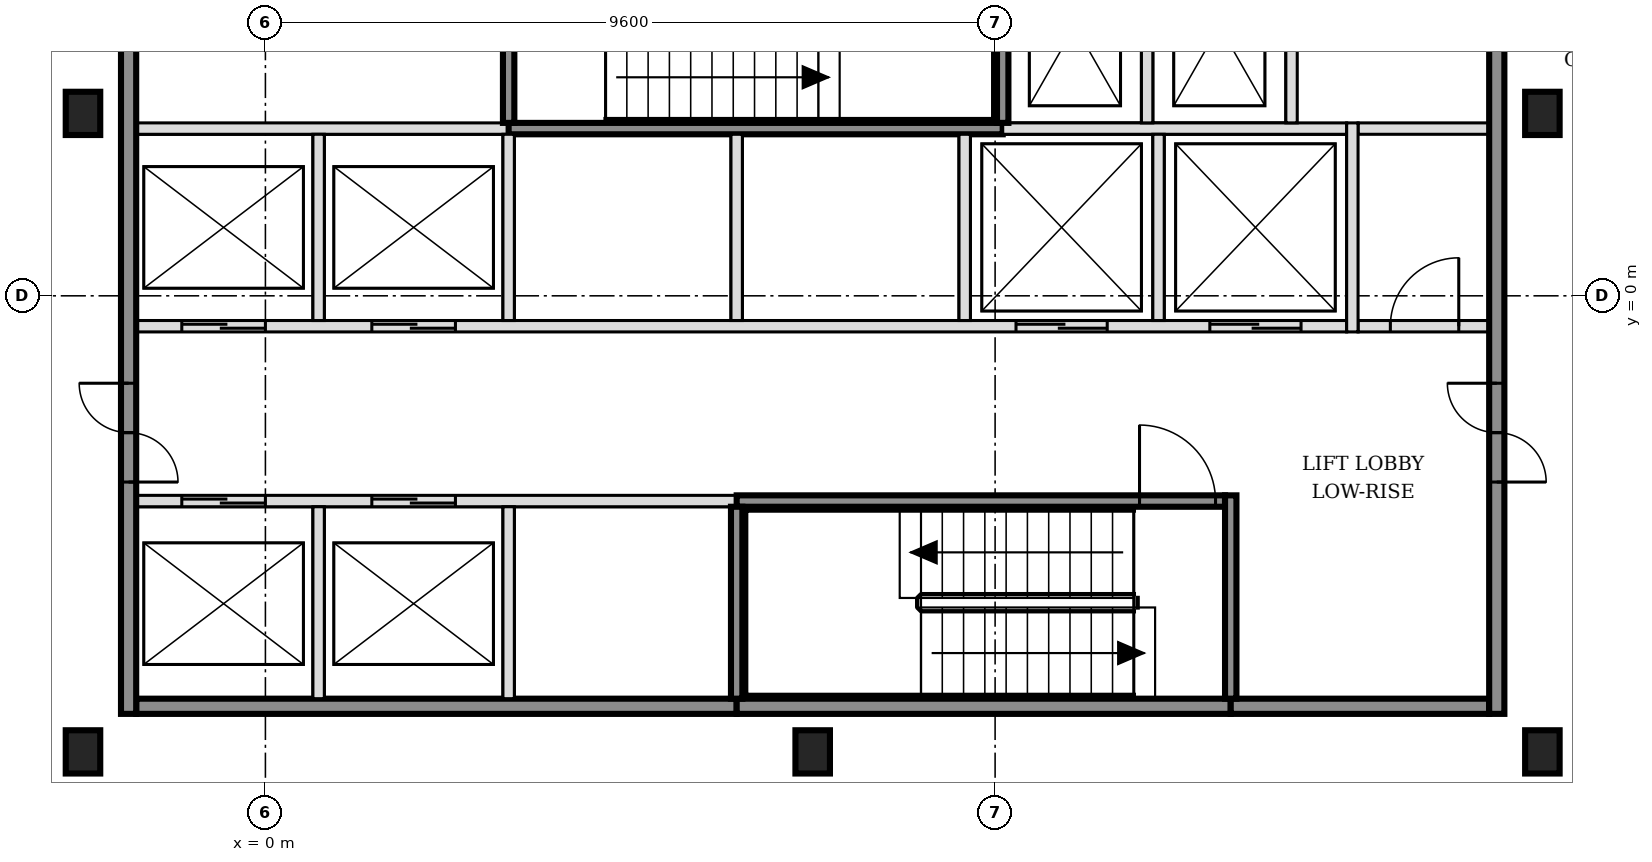
"""IFC4 building model, lengths in metres.
Left out: names, types, materials, properties, quantities, classifications, styles, units other than length and angle.
Written with IfcOpenShell. Run it as: python <this file> out.ifc"""

import sys

from ifc_helpers import new_model, si_unit, direction, frame, frame_2d, origin, origin_2d, place, context, subcontext, project, spatial, rectangle, i_section, extrude, element, fill, save


model = new_model("IFC4")
c1 = context("Model", 3, precision=1e-05, world=origin(), true_north=direction((0.0, 1.0)))
c2 = subcontext(c1, "Body", "Model", "MODEL_VIEW")
j1 = project(units=[si_unit("LENGTHUNIT", "METRE"), si_unit("PLANEANGLEUNIT", "RADIAN")], contexts=[c1])
p1 = place(None, origin())
s1 = spatial("IfcSite", under=j1, at=p1, CompositionType="ELEMENT")
p2 = place(p1, origin())
s2 = spatial("IfcBuilding", under=s1, at=p2, CompositionType="ELEMENT")
p3 = place(p2, frame((0.0, 0.0, 43.8)))
s3 = spatial("IfcBuildingStorey", under=s2, at=p3, CompositionType="ELEMENT", Elevation=43.8)
for number, where, z_axis, x_axis in (
    (1, (-2.4, -6.0, -0.15), (0.0, 0.0, 1.0), (1.0, 0.0, 0.0)),
    (2, (7.2, -6.0, -0.15), (0.0, 0.0, 1.0), (1.0, 0.0, 0.0)),
    (3, (16.8, -6.0, -0.15), (0.0, 0.0, 1.0), (1.0, 0.0, 0.0)),
    (4, (-2.4, 2.4, -0.15), (0.0, 0.0, 1.0), (1.0, 0.0, 0.0)),
    (5, (16.8, 2.4, -0.15), (0.0, 0.0, 1.0), (1.0, 0.0, 0.0)),
):
    element("IfcColumn", number, at=place(p3, frame(where, z_axis=z_axis, x_axis=x_axis)), inside=s3, PredefinedType="COLUMN", context=c2, shape_type="SweptSolid", body=[
        extrude(i_section(OverallWidth=0.454, OverallDepth=0.569, WebThickness=0.078, FlangeThickness=0.125, FilletRadius=0.015, at=origin_2d()), origin(), (0.0, 0.0, 1.0), 3.6),
    ])
p4 = place(p3, frame((-1.7, -5.4, 0.0), z_axis=(0.0, 0.0, 1.0), x_axis=(1.0, 0.0, 0.0)))
e6 = element("IfcWall", 6, at=p4, inside=s3, PredefinedType="SOLIDWALL", context=c2, shape_type="SweptSolid", body=[
    extrude(rectangle(XDim=7.9, YDim=0.2, at=frame_2d((3.95, 0.0))), origin(), (0.0, 0.0, 1.0), 3.45),
])
p5 = place(p3, frame((6.2, -5.4, 0.0), z_axis=(0.0, 0.0, 1.0), x_axis=(1.0, 0.0, 0.0)))
e7 = element("IfcWall", 7, at=p5, inside=s3, PredefinedType="SOLIDWALL", context=c2, shape_type="SweptSolid", body=[
    extrude(rectangle(XDim=6.5, YDim=0.2, at=frame_2d((3.25, 0.0))), origin(), (0.0, 0.0, 1.0), 3.45),
])
p6 = place(p3, frame((12.7, -5.4, 0.0), z_axis=(0.0, 0.0, 1.0), x_axis=(1.0, 0.0, 0.0)))
e8 = element("IfcWall", 8, at=p6, inside=s3, PredefinedType="SOLIDWALL", context=c2, shape_type="SweptSolid", body=[
    extrude(rectangle(XDim=3.4, YDim=0.2, at=frame_2d((1.7, 0.0))), origin(), (0.0, 0.0, 1.0), 3.45),
])
p7 = place(p3, frame((-1.7, -2.7, 0.0), z_axis=(0.0, 0.0, 1.0), x_axis=(1.0, 0.0, 0.0)))
e9 = element("IfcWall", 9, at=p7, inside=s3, PredefinedType="SOLIDWALL", context=c2, shape_type="SweptSolid", body=[
    extrude(rectangle(XDim=7.9, YDim=0.15, at=frame_2d((3.95, 0.0))), origin(), (0.0, 0.0, 1.0), 3.45),
])
p8 = place(p7, frame((0.6, 0.0, 0.0)))
e10 = element("IfcOpeningElement", 10, at=p8, cuts=e9, PredefinedType="OPENING", context=c2, shape_type="SweptSolid", body=[
    extrude(rectangle(XDim=1.1, YDim=2.1, at=frame_2d((0.55, 1.05))), frame((0.0, 0.085, 0.0), z_axis=(0.0, -1.0, 0.0), x_axis=(1.0, 0.0, 0.0)), (0.0, 0.0, 1.0), 0.17),
])
p9 = place(p7, frame((3.1, 0.0, 0.0)))
e11 = element("IfcOpeningElement", 11, at=p9, cuts=e9, PredefinedType="OPENING", context=c2, shape_type="SweptSolid", body=[
    extrude(rectangle(XDim=1.1, YDim=2.1, at=frame_2d((0.55, 1.05))), frame((0.0, 0.085, 0.0), z_axis=(0.0, -1.0, 0.0), x_axis=(1.0, 0.0, 0.0)), (0.0, 0.0, 1.0), 0.17),
])
p10 = place(p3, frame((6.2, -2.7, 0.0), z_axis=(0.0, 0.0, 1.0), x_axis=(1.0, 0.0, 0.0)))
e12 = element("IfcWall", 12, at=p10, inside=s3, PredefinedType="SOLIDWALL", context=c2, shape_type="SweptSolid", body=[
    extrude(rectangle(XDim=6.425, YDim=0.15, at=frame_2d((3.212, 0.0))), origin(), (0.0, 0.0, 1.0), 3.45),
])
p11 = place(p10, frame((5.3, 0.0, 0.0)))
e13 = element("IfcOpeningElement", 13, at=p11, cuts=e12, PredefinedType="OPENING", context=c2, shape_type="SweptSolid", body=[
    extrude(rectangle(XDim=1.0, YDim=2.1, at=frame_2d((0.5, 1.05))), frame((0.0, 0.085, 0.0), z_axis=(0.0, -1.0, 0.0), x_axis=(1.0, 0.0, 0.0)), (0.0, 0.0, 1.0), 0.17),
])
p12 = place(p3, frame((-1.7, -0.4, 0.0), z_axis=(0.0, 0.0, 1.0), x_axis=(1.0, 0.0, 0.0)))
e14 = element("IfcWall", 14, at=p12, inside=s3, PredefinedType="SOLIDWALL", context=c2, shape_type="SweptSolid", body=[
    extrude(rectangle(XDim=15.925, YDim=0.15, at=frame_2d((7.962, 0.0))), origin(), (0.0, 0.0, 1.0), 3.45),
])
p13 = place(p12, frame((0.6, 0.0, 0.0)))
e15 = element("IfcOpeningElement", 15, at=p13, cuts=e14, PredefinedType="OPENING", context=c2, shape_type="SweptSolid", body=[
    extrude(rectangle(XDim=1.1, YDim=2.1, at=frame_2d((0.55, 1.05))), frame((0.0, 0.085, 0.0), z_axis=(0.0, -1.0, 0.0), x_axis=(1.0, 0.0, 0.0)), (0.0, 0.0, 1.0), 0.17),
])
p14 = place(p12, frame((3.1, 0.0, 0.0)))
e16 = element("IfcOpeningElement", 16, at=p14, cuts=e14, PredefinedType="OPENING", context=c2, shape_type="SweptSolid", body=[
    extrude(rectangle(XDim=1.1, YDim=2.1, at=frame_2d((0.55, 1.05))), frame((0.0, 0.085, 0.0), z_axis=(0.0, -1.0, 0.0), x_axis=(1.0, 0.0, 0.0)), (0.0, 0.0, 1.0), 0.17),
])
p15 = place(p12, frame((11.575, 0.0, 0.0)))
e17 = element("IfcOpeningElement", 17, at=p15, cuts=e14, PredefinedType="OPENING", context=c2, shape_type="SweptSolid", body=[
    extrude(rectangle(XDim=1.2, YDim=2.1, at=frame_2d((0.6, 1.05))), frame((0.0, 0.085, 0.0), z_axis=(0.0, -1.0, 0.0), x_axis=(1.0, 0.0, 0.0)), (0.0, 0.0, 1.0), 0.17),
])
p16 = place(p12, frame((14.125, 0.0, 0.0)))
e18 = element("IfcOpeningElement", 18, at=p16, cuts=e14, PredefinedType="OPENING", context=c2, shape_type="SweptSolid", body=[
    extrude(rectangle(XDim=1.2, YDim=2.1, at=frame_2d((0.6, 1.05))), frame((0.0, 0.085, 0.0), z_axis=(0.0, -1.0, 0.0), x_axis=(1.0, 0.0, 0.0)), (0.0, 0.0, 1.0), 0.17),
])
p17 = place(p3, frame((14.375, -0.4, 0.0), z_axis=(0.0, 0.0, 1.0), x_axis=(1.0, 0.0, 0.0)))
e19 = element("IfcWall", 19, at=p17, inside=s3, PredefinedType="PARTITIONING", context=c2, shape_type="SweptSolid", body=[
    extrude(rectangle(XDim=1.725, YDim=0.15, at=frame_2d((0.863, 0.0))), origin(), (0.0, 0.0, 1.0), 3.45),
])
p18 = place(p17, frame((0.425, 0.0, 0.0)))
e20 = element("IfcOpeningElement", 20, at=p18, cuts=e19, PredefinedType="OPENING", context=c2, shape_type="SweptSolid", body=[
    extrude(rectangle(XDim=0.9, YDim=2.1, at=frame_2d((0.45, 1.05))), frame((0.0, 0.085, 0.0), z_axis=(0.0, -1.0, 0.0), x_axis=(1.0, 0.0, 0.0)), (0.0, 0.0, 1.0), 0.17),
])
p19 = place(p3, frame((-1.7, 2.2, 0.0), z_axis=(0.0, 0.0, 1.0), x_axis=(1.0, 0.0, 0.0)))
e21 = element("IfcWall", 21, at=p19, inside=s3, PredefinedType="SOLIDWALL", context=c2, shape_type="SweptSolid", body=[
    extrude(rectangle(XDim=4.9, YDim=0.15, at=frame_2d((2.45, 0.0))), origin(), (0.0, 0.0, 1.0), 3.45),
])
p20 = place(p3, frame((3.2, 2.2, 0.0), z_axis=(0.0, 0.0, 1.0), x_axis=(1.0, 0.0, 0.0)))
e22 = element("IfcWall", 22, at=p20, inside=s3, PredefinedType="SOLIDWALL", context=c2, shape_type="SweptSolid", body=[
    extrude(rectangle(XDim=6.5, YDim=0.15, at=frame_2d((3.25, 0.0))), origin(), (0.0, 0.0, 1.0), 3.45),
])
p21 = place(p3, frame((9.7, 2.2, 0.0), z_axis=(0.0, 0.0, 1.0), x_axis=(1.0, 0.0, 0.0)))
e23 = element("IfcWall", 23, at=p21, inside=s3, PredefinedType="SOLIDWALL", context=c2, shape_type="SweptSolid", body=[
    extrude(rectangle(XDim=4.525, YDim=0.15, at=frame_2d((2.263, 0.0))), origin(), (0.0, 0.0, 1.0), 3.45),
])
p22 = place(p3, frame((14.375, 2.2, 0.0), z_axis=(0.0, 0.0, 1.0), x_axis=(1.0, 0.0, 0.0)))
e24 = element("IfcWall", 24, at=p22, inside=s3, PredefinedType="PARTITIONING", context=c2, shape_type="SweptSolid", body=[
    extrude(rectangle(XDim=1.725, YDim=0.15, at=frame_2d((0.863, 0.0))), origin(), (0.0, 0.0, 1.0), 3.45),
])
p23 = place(p3, frame((-1.8, -5.5, 0.0), z_axis=(0.0, 0.0, 1.0), x_axis=(0.0, 1.0, 0.0)))
e25 = element("IfcWall", 25, at=p23, inside=s3, PredefinedType="SOLIDWALL", context=c2, shape_type="SweptSolid", body=[
    extrude(rectangle(XDim=15.8, YDim=0.2, at=frame_2d((7.9, 0.0))), origin(), (0.0, 0.0, 1.0), 3.45),
])
p24 = place(p23, frame((3.05, 0.0, 0.0)))
e26 = element("IfcOpeningElement", 26, at=p24, cuts=e25, PredefinedType="OPENING", context=c2, shape_type="SweptSolid", body=[
    extrude(rectangle(XDim=1.3, YDim=2.1, at=frame_2d((0.65, 1.05))), frame((0.0, 0.11, 0.0), z_axis=(0.0, -1.0, 0.0), x_axis=(1.0, 0.0, 0.0)), (0.0, 0.0, 1.0), 0.22),
])
p25 = place(p23, frame((11.45, 0.0, 0.0)))
e27 = element("IfcOpeningElement", 27, at=p25, cuts=e25, PredefinedType="OPENING", context=c2, shape_type="SweptSolid", body=[
    extrude(rectangle(XDim=1.3, YDim=2.1, at=frame_2d((0.65, 1.05))), frame((0.0, 0.11, 0.0), z_axis=(0.0, -1.0, 0.0), x_axis=(1.0, 0.0, 0.0)), (0.0, 0.0, 1.0), 0.22),
])
p26 = place(p3, frame((0.7, -5.3, 0.0), z_axis=(0.0, 0.0, 1.0), x_axis=(0.0, 1.0, 0.0)))
e28 = element("IfcWall", 28, at=p26, inside=s3, PredefinedType="SOLIDWALL", context=c2, shape_type="SweptSolid", body=[
    extrude(rectangle(XDim=2.525, YDim=0.15, at=frame_2d((1.263, 0.0))), origin(), (0.0, 0.0, 1.0), 3.45),
])
p27 = place(p3, frame((0.7, -0.325, 0.0), z_axis=(0.0, 0.0, 1.0), x_axis=(0.0, 1.0, 0.0)))
e29 = element("IfcWall", 29, at=p27, inside=s3, PredefinedType="SOLIDWALL", context=c2, shape_type="SweptSolid", body=[
    extrude(rectangle(XDim=2.45, YDim=0.15, at=frame_2d((1.225, 0.0))), origin(), (0.0, 0.0, 1.0), 3.45),
])
p28 = place(p3, frame((3.2, -5.3, 0.0), z_axis=(0.0, 0.0, 1.0), x_axis=(0.0, 1.0, 0.0)))
e30 = element("IfcWall", 30, at=p28, inside=s3, PredefinedType="SOLIDWALL", context=c2, shape_type="SweptSolid", body=[
    extrude(rectangle(XDim=2.525, YDim=0.15, at=frame_2d((1.263, 0.0))), origin(), (0.0, 0.0, 1.0), 3.45),
])
p29 = place(p3, frame((3.2, -0.325, 0.0), z_axis=(0.0, 0.0, 1.0), x_axis=(0.0, 1.0, 0.0)))
e31 = element("IfcWall", 31, at=p29, inside=s3, PredefinedType="SOLIDWALL", context=c2, shape_type="SweptSolid", body=[
    extrude(rectangle(XDim=2.45, YDim=0.15, at=frame_2d((1.225, 0.0))), origin(), (0.0, 0.0, 1.0), 3.45),
])
p30 = place(p3, frame((3.2, 2.275, 0.0), z_axis=(0.0, 0.0, 1.0), x_axis=(0.0, 1.0, 0.0)))
e32 = element("IfcWall", 32, at=p30, inside=s3, PredefinedType="SOLIDWALL", context=c2, shape_type="SweptSolid", body=[
    extrude(rectangle(XDim=2.7, YDim=0.15, at=frame_2d((1.35, 0.0))), origin(), (0.0, 0.0, 1.0), 3.45),
])
p31 = place(p3, frame((6.2, -5.3, 0.0), z_axis=(0.0, 0.0, 1.0), x_axis=(0.0, 1.0, 0.0)))
e33 = element("IfcWall", 33, at=p31, inside=s3, PredefinedType="SOLIDWALL", context=c2, shape_type="SweptSolid", body=[
    extrude(rectangle(XDim=2.525, YDim=0.15, at=frame_2d((1.263, 0.0))), origin(), (0.0, 0.0, 1.0), 3.45),
])
for number, where, z_axis, x_axis in (
    (34, (6.2, -0.325, 0.0), (0.0, 0.0, 1.0), (0.0, 1.0, 0.0)),
    (35, (9.2, -0.325, 0.0), (0.0, 0.0, 1.0), (0.0, 1.0, 0.0)),
):
    element("IfcWall", number, at=place(p3, frame(where, z_axis=z_axis, x_axis=x_axis)), inside=s3, PredefinedType="SOLIDWALL", context=c2, shape_type="SweptSolid", body=[
        extrude(rectangle(XDim=2.45, YDim=0.15, at=frame_2d((1.225, 0.0))), origin(), (0.0, 0.0, 1.0), 3.45),
    ])
for number, where, z_axis, x_axis in (
    (36, (9.7, 2.275, 0.0), (0.0, 0.0, 1.0), (0.0, 1.0, 0.0)),
    (37, (11.6, 2.275, 0.0), (0.0, 0.0, 1.0), (0.0, 1.0, 0.0)),
):
    element("IfcWall", number, at=place(p3, frame(where, z_axis=z_axis, x_axis=x_axis)), inside=s3, PredefinedType="SOLIDWALL", context=c2, shape_type="SweptSolid", body=[
        extrude(rectangle(XDim=2.55, YDim=0.15, at=frame_2d((1.275, 0.0))), origin(), (0.0, 0.0, 1.0), 3.45),
    ])
p32 = place(p3, frame((11.75, -0.325, 0.0), z_axis=(0.0, 0.0, 1.0), x_axis=(0.0, 1.0, 0.0)))
e38 = element("IfcWall", 38, at=p32, inside=s3, PredefinedType="SOLIDWALL", context=c2, shape_type="SweptSolid", body=[
    extrude(rectangle(XDim=2.45, YDim=0.15, at=frame_2d((1.225, 0.0))), origin(), (0.0, 0.0, 1.0), 3.45),
])
p33 = place(p3, frame((12.7, -5.3, 0.0), z_axis=(0.0, 0.0, 1.0), x_axis=(0.0, 1.0, 0.0)))
e39 = element("IfcWall", 39, at=p33, inside=s3, PredefinedType="SOLIDWALL", context=c2, shape_type="SweptSolid", body=[
    extrude(rectangle(XDim=2.675, YDim=0.15, at=frame_2d((1.337, 0.0))), origin(), (0.0, 0.0, 1.0), 3.45),
])
p34 = place(p3, frame((13.5, 2.275, 0.0), z_axis=(0.0, 0.0, 1.0), x_axis=(0.0, 1.0, 0.0)))
e40 = element("IfcWall", 40, at=p34, inside=s3, PredefinedType="SOLIDWALL", context=c2, shape_type="SweptSolid", body=[
    extrude(rectangle(XDim=2.55, YDim=0.15, at=frame_2d((1.275, 0.0))), origin(), (0.0, 0.0, 1.0), 3.45),
])
p35 = place(p3, frame((14.3, -0.475, 0.0), z_axis=(0.0, 0.0, 1.0), x_axis=(0.0, 1.0, 0.0)))
e41 = element("IfcWall", 41, at=p35, inside=s3, PredefinedType="SOLIDWALL", context=c2, shape_type="SweptSolid", body=[
    extrude(rectangle(XDim=2.75, YDim=0.15, at=frame_2d((1.375, 0.0))), origin(), (0.0, 0.0, 1.0), 3.45),
])
p36 = place(p3, frame((16.2, -5.5, 0.0), z_axis=(0.0, 0.0, 1.0), x_axis=(0.0, 1.0, 0.0)))
e42 = element("IfcWall", 42, at=p36, inside=s3, PredefinedType="SOLIDWALL", context=c2, shape_type="SweptSolid", body=[
    extrude(rectangle(XDim=15.8, YDim=0.2, at=frame_2d((7.9, 0.0))), origin(), (0.0, 0.0, 1.0), 3.45),
])
p37 = place(p36, frame((3.05, 0.0, 0.0)))
e43 = element("IfcOpeningElement", 43, at=p37, cuts=e42, PredefinedType="OPENING", context=c2, shape_type="SweptSolid", body=[
    extrude(rectangle(XDim=1.3, YDim=2.1, at=frame_2d((0.65, 1.05))), frame((0.0, 0.11, 0.0), z_axis=(0.0, -1.0, 0.0), x_axis=(1.0, 0.0, 0.0)), (0.0, 0.0, 1.0), 0.22),
])
p38 = place(p36, frame((11.45, 0.0, 0.0)))
e44 = element("IfcOpeningElement", 44, at=p38, cuts=e42, PredefinedType="OPENING", context=c2, shape_type="SweptSolid", body=[
    extrude(rectangle(XDim=1.3, YDim=2.1, at=frame_2d((0.65, 1.05))), frame((0.0, 0.11, 0.0), z_axis=(0.0, -1.0, 0.0), x_axis=(1.0, 0.0, 0.0)), (0.0, 0.0, 1.0), 0.22),
])
p39 = place(p8, origin())
e45 = element("IfcDoor", 45, at=p39, inside=s3, OperationType="DOUBLE_DOOR_SLIDING", PredefinedType="DOOR", context=c2, shape_type="SweptSolid", body=[
    extrude(rectangle(XDim=1.1, YDim=2.1, at=frame_2d((0.55, 1.05))), frame((0.0, 0.025, 0.0), z_axis=(0.0, -1.0, 0.0), x_axis=(1.0, 0.0, 0.0)), (0.0, 0.0, 1.0), 0.05),
])
fill(e10, e45)
p40 = place(p9, origin())
e46 = element("IfcDoor", 46, at=p40, inside=s3, OperationType="DOUBLE_DOOR_SLIDING", PredefinedType="DOOR", context=c2, shape_type="SweptSolid", body=[
    extrude(rectangle(XDim=1.1, YDim=2.1, at=frame_2d((0.55, 1.05))), frame((0.0, 0.025, 0.0), z_axis=(0.0, -1.0, 0.0), x_axis=(1.0, 0.0, 0.0)), (0.0, 0.0, 1.0), 0.05),
])
fill(e11, e46)
p41 = place(p13, origin())
e47 = element("IfcDoor", 47, at=p41, inside=s3, OperationType="DOUBLE_DOOR_SLIDING", PredefinedType="DOOR", context=c2, shape_type="SweptSolid", body=[
    extrude(rectangle(XDim=1.1, YDim=2.1, at=frame_2d((0.55, 1.05))), frame((0.0, 0.025, 0.0), z_axis=(0.0, -1.0, 0.0), x_axis=(1.0, 0.0, 0.0)), (0.0, 0.0, 1.0), 0.05),
])
fill(e15, e47)
p42 = place(p14, origin())
e48 = element("IfcDoor", 48, at=p42, inside=s3, OperationType="DOUBLE_DOOR_SLIDING", PredefinedType="DOOR", context=c2, shape_type="SweptSolid", body=[
    extrude(rectangle(XDim=1.1, YDim=2.1, at=frame_2d((0.55, 1.05))), frame((0.0, 0.025, 0.0), z_axis=(0.0, -1.0, 0.0), x_axis=(1.0, 0.0, 0.0)), (0.0, 0.0, 1.0), 0.05),
])
fill(e16, e48)
p43 = place(p15, origin())
e49 = element("IfcDoor", 49, at=p43, inside=s3, OperationType="DOUBLE_DOOR_SLIDING", PredefinedType="DOOR", context=c2, shape_type="SweptSolid", body=[
    extrude(rectangle(XDim=1.2, YDim=2.1, at=frame_2d((0.6, 1.05))), frame((0.0, 0.025, 0.0), z_axis=(0.0, -1.0, 0.0), x_axis=(1.0, 0.0, 0.0)), (0.0, 0.0, 1.0), 0.05),
])
fill(e17, e49)
p44 = place(p16, origin())
e50 = element("IfcDoor", 50, at=p44, inside=s3, OperationType="DOUBLE_DOOR_SLIDING", PredefinedType="DOOR", context=c2, shape_type="SweptSolid", body=[
    extrude(rectangle(XDim=1.2, YDim=2.1, at=frame_2d((0.6, 1.05))), frame((0.0, 0.025, 0.0), z_axis=(0.0, -1.0, 0.0), x_axis=(1.0, 0.0, 0.0)), (0.0, 0.0, 1.0), 0.05),
])
fill(e18, e50)
p45 = place(p11, origin())
e51 = element("IfcDoor", 51, at=p45, inside=s3, OperationType="SINGLE_SWING_LEFT", PredefinedType="DOOR", context=c2, shape_type="SweptSolid", body=[
    extrude(rectangle(XDim=1.0, YDim=2.1, at=frame_2d((0.5, 1.05))), frame((0.0, 0.025, 0.0), z_axis=(0.0, -1.0, 0.0), x_axis=(1.0, 0.0, 0.0)), (0.0, 0.0, 1.0), 0.05),
])
fill(e13, e51)
p46 = place(p24, origin())
e52 = element("IfcDoor", 52, at=p46, inside=s3, OperationType="DOUBLE_DOOR_SINGLE_SWING", PredefinedType="DOOR", context=c2, shape_type="SweptSolid", body=[
    extrude(rectangle(XDim=1.3, YDim=2.1, at=frame_2d((0.65, 1.05))), frame((0.0, 0.025, 0.0), z_axis=(0.0, -1.0, 0.0), x_axis=(1.0, 0.0, 0.0)), (0.0, 0.0, 1.0), 0.05),
])
fill(e26, e52)
p47 = place(p37, origin())
e53 = element("IfcDoor", 53, at=p47, inside=s3, OperationType="DOUBLE_DOOR_SINGLE_SWING", PredefinedType="DOOR", context=c2, shape_type="SweptSolid", body=[
    extrude(rectangle(XDim=1.3, YDim=2.1, at=frame_2d((0.65, 1.05))), frame((0.0, 0.025, 0.0), z_axis=(0.0, -1.0, 0.0), x_axis=(1.0, 0.0, 0.0)), (0.0, 0.0, 1.0), 0.05),
])
fill(e43, e53)
p48 = place(p18, origin())
e54 = element("IfcDoor", 54, at=p48, inside=s3, OperationType="SINGLE_SWING_RIGHT", PredefinedType="DOOR", context=c2, shape_type="SweptSolid", body=[
    extrude(rectangle(XDim=0.9, YDim=2.1, at=frame_2d((0.45, 1.05))), frame((0.0, 0.025, 0.0), z_axis=(0.0, -1.0, 0.0), x_axis=(1.0, 0.0, 0.0)), (0.0, 0.0, 1.0), 0.05),
])
fill(e20, e54)
save(model, sys.argv[1])
